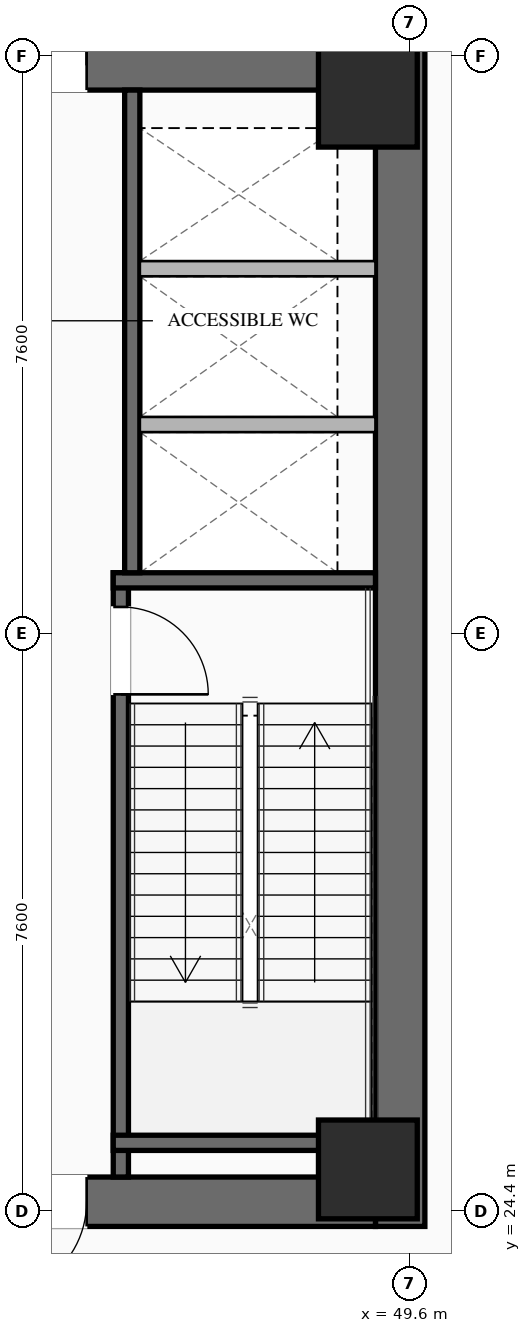
"""IFC4 building model, lengths in metres.
Left out: names, types, materials, properties, quantities, classifications, styles, units other than length and angle.
Written with IfcOpenShell. Run it as: python <this file> out.ifc"""

import sys

from ifc_helpers import new_model, si_unit, direction, frame, frame_2d, origin, origin_2d, place, context, subcontext, project, spatial, rectangle, hollow_rectangle, extrude, element, fill, save


model = new_model("IFC4")
c1 = context("Model", 3, precision=1e-05, world=origin(), true_north=direction((0.0, 1.0)))
c2 = subcontext(c1, "Body", "Model", "MODEL_VIEW")
j1 = project(units=[si_unit("LENGTHUNIT", "METRE"), si_unit("PLANEANGLEUNIT", "RADIAN")], contexts=[c1])
p1 = place(None, origin())
s1 = spatial("IfcSite", under=j1, at=p1, CompositionType="ELEMENT")
p2 = place(p1, origin())
s2 = spatial("IfcBuilding", under=s1, at=p2, CompositionType="ELEMENT")
p3 = place(p2, frame((0.0, 0.0, -5.5)))
s3 = spatial("IfcBuildingStorey", under=s2, at=p3, CompositionType="ELEMENT", Elevation=-5.5)
p4 = place(p3, frame((49.475, 39.8, 0.0), z_axis=(0.0, 0.0, 1.0), x_axis=(0.0, -1.0, 0.0)))
e1 = element("IfcWall", 1, at=p4, inside=s3, PredefinedType="SHEAR", context=c2, shape_type="SweptSolid", body=[
    extrude(rectangle(XDim=15.6, YDim=0.65, at=frame_2d((7.8, 0.0))), origin(), (0.0, 0.0, 1.0), 5.5),
])
p5 = place(p3, frame((49.15, 24.525, 0.0), z_axis=(0.0, 0.0, 1.0), x_axis=(-1.0, 0.0, 0.0)))
e2 = element("IfcWall", 2, at=p5, inside=s3, PredefinedType="SHEAR", context=c2, shape_type="SweptSolid", body=[
    extrude(rectangle(XDim=14.3, YDim=0.65, at=frame_2d((7.15, 0.0))), origin(), (0.0, 0.0, 1.0), 5.5),
])
p6 = place(p5, frame((8.85, 0.0, 0.0)))
e3 = element("IfcOpeningElement", 3, at=p6, cuts=e2, PredefinedType="OPENING", context=c2, shape_type="SweptSolid", body=[
    extrude(rectangle(XDim=1.25, YDim=2.25, at=frame_2d((0.625, 1.125))), frame((0.0, 0.335, 0.0), z_axis=(0.0, -1.0, 0.0), x_axis=(1.0, 0.0, 0.0)), (0.0, 0.0, 1.0), 0.67),
])
p7 = place(p5, frame((3.8, 0.0, 0.0)))
e4 = element("IfcOpeningElement", 4, at=p7, cuts=e2, PredefinedType="OPENING", context=c2, shape_type="SweptSolid", body=[
    extrude(rectangle(XDim=1.25, YDim=2.25, at=frame_2d((0.625, 1.125))), frame((0.0, 0.335, 0.0), z_axis=(0.0, -1.0, 0.0), x_axis=(1.0, 0.0, 0.0)), (0.0, 0.0, 1.0), 0.67),
])
p8 = place(p3, frame((34.85, 39.475, 0.0), z_axis=(0.0, 0.0, 1.0), x_axis=(1.0, 0.0, 0.0)))
e5 = element("IfcWall", 5, at=p8, inside=s3, PredefinedType="SHEAR", context=c2, shape_type="SweptSolid", body=[
    extrude(rectangle(XDim=14.3, YDim=0.65, at=frame_2d((7.15, 0.0))), origin(), (0.0, 0.0, 1.0), 5.5),
])
p9 = place(p8, frame((4.2, 0.0, 0.0)))
e6 = element("IfcOpeningElement", 6, at=p9, cuts=e5, PredefinedType="OPENING", context=c2, shape_type="SweptSolid", body=[
    extrude(rectangle(XDim=1.25, YDim=2.25, at=frame_2d((0.625, 1.125))), frame((0.0, 0.335, 0.0), z_axis=(0.0, -1.0, 0.0), x_axis=(1.0, 0.0, 0.0)), (0.0, 0.0, 1.0), 0.67),
])
p10 = place(p8, frame((9.25, 0.0, 0.0)))
e7 = element("IfcOpeningElement", 7, at=p10, cuts=e5, PredefinedType="OPENING", context=c2, shape_type="SweptSolid", body=[
    extrude(rectangle(XDim=1.25, YDim=2.25, at=frame_2d((0.625, 1.125))), frame((0.0, 0.335, 0.0), z_axis=(0.0, -1.0, 0.0), x_axis=(1.0, 0.0, 0.0)), (0.0, 0.0, 1.0), 0.67),
])
for number, where, z_axis, x_axis in (
    (8, (49.05, 24.95, 0.0), (0.0, 0.0, 1.0), (1.0, 0.0, 0.0)),
    (9, (49.05, 39.05, 0.0), (0.0, 0.0, 1.0), (1.0, 0.0, 0.0)),
):
    element("IfcColumn", number, at=place(p3, frame(where, z_axis=z_axis, x_axis=x_axis)), inside=s3, PredefinedType="COLUMN", context=c2, shape_type="SweptSolid", body=[
        extrude(hollow_rectangle(XDim=1.3, YDim=1.3, WallThickness=0.05, at=origin_2d()), origin(), (0.0, 0.0, 1.0), 5.2),
    ])
p11 = place(p3, frame((45.8, 32.8, 0.0), z_axis=(0.0, 0.0, 1.0), x_axis=(0.0, -1.0, 0.0)))
e10 = element("IfcWall", 10, at=p11, inside=s3, PredefinedType="SHEAR", context=c2, shape_type="SweptSolid", body=[
    extrude(rectangle(XDim=7.95, YDim=0.2, at=frame_2d((3.975, 0.0))), origin(), (0.0, 0.0, 1.0), 5.2),
])
p12 = place(p11, frame((0.45, 0.0, 0.0)))
e11 = element("IfcOpeningElement", 11, at=p12, cuts=e10, PredefinedType="OPENING", context=c2, shape_type="SweptSolid", body=[
    extrude(rectangle(XDim=1.15, YDim=2.2, at=frame_2d((0.575, 1.1))), frame((0.0, 0.11, 0.0), z_axis=(0.0, -1.0, 0.0), x_axis=(1.0, 0.0, 0.0)), (0.0, 0.0, 1.0), 0.22),
])
for number, where, z_axis, x_axis in (
    (12, (45.7, 32.7, 0.0), (0.0, 0.0, 1.0), (1.0, 0.0, 0.0)),
    (13, (45.7, 25.3, 0.0), (0.0, 0.0, 1.0), (1.0, 0.0, 0.0)),
):
    element("IfcWall", number, at=place(p3, frame(where, z_axis=z_axis, x_axis=x_axis)), inside=s3, PredefinedType="SHEAR", context=c2, shape_type="SweptSolid", body=[
        extrude(rectangle(XDim=3.45, YDim=0.2, at=frame_2d((1.725, 0.0))), origin(), (0.0, 0.0, 1.0), 5.2),
    ])
p13 = place(p3, frame((45.95, 39.15, 0.0), z_axis=(0.0, 0.0, 1.0), x_axis=(0.0, -1.0, 0.0)))
e14 = element("IfcWall", 14, at=p13, inside=s3, PredefinedType="SHEAR", context=c2, shape_type="SweptSolid", body=[
    extrude(rectangle(XDim=6.35, YDim=0.2, at=frame_2d((3.175, 0.0))), origin(), (0.0, 0.0, 1.0), 5.2),
])
for number, where, z_axis, x_axis in (
    (15, (46.05, 34.75, 0.0), (0.0, 0.0, 1.0), (1.0, 0.0, 0.0)),
    (16, (46.05, 36.8, 0.0), (0.0, 0.0, 1.0), (1.0, 0.0, 0.0)),
):
    element("IfcWall", number, at=place(p3, frame(where, z_axis=z_axis, x_axis=x_axis)), inside=s3, PredefinedType="SOLIDWALL", context=c2, shape_type="SweptSolid", body=[
        extrude(rectangle(XDim=3.1, YDim=0.2, at=frame_2d((1.55, 0.0))), origin(), (0.0, 0.0, 1.0), 5.2),
    ])
p14 = place(p10, origin())
e17 = element("IfcDoor", 17, at=p14, inside=s3, OperationType="SINGLE_SWING_RIGHT", PredefinedType="DOOR", context=c2, shape_type="SweptSolid", body=[
    extrude(rectangle(XDim=1.25, YDim=2.25, at=frame_2d((0.625, 1.125))), frame((0.0, 0.025, 0.0), z_axis=(0.0, -1.0, 0.0), x_axis=(1.0, 0.0, 0.0)), (0.0, 0.0, 1.0), 0.05),
])
fill(e7, e17)
p15 = place(p7, origin())
e18 = element("IfcDoor", 18, at=p15, inside=s3, OperationType="SINGLE_SWING_RIGHT", PredefinedType="DOOR", context=c2, shape_type="SweptSolid", body=[
    extrude(rectangle(XDim=1.25, YDim=2.25, at=frame_2d((0.625, 1.125))), frame((0.0, 0.025, 0.0), z_axis=(0.0, -1.0, 0.0), x_axis=(1.0, 0.0, 0.0)), (0.0, 0.0, 1.0), 0.05),
])
fill(e4, e18)
p16 = place(p12, origin())
e19 = element("IfcDoor", 19, at=p16, inside=s3, OperationType="SINGLE_SWING_RIGHT", PredefinedType="DOOR", context=c2, shape_type="SweptSolid", body=[
    extrude(rectangle(XDim=1.15, YDim=2.2, at=frame_2d((0.575, 1.1))), frame((0.0, 0.025, 0.0), z_axis=(0.0, -1.0, 0.0), x_axis=(1.0, 0.0, 0.0)), (0.0, 0.0, 1.0), 0.05),
])
fill(e11, e19)
save(model, sys.argv[1])
